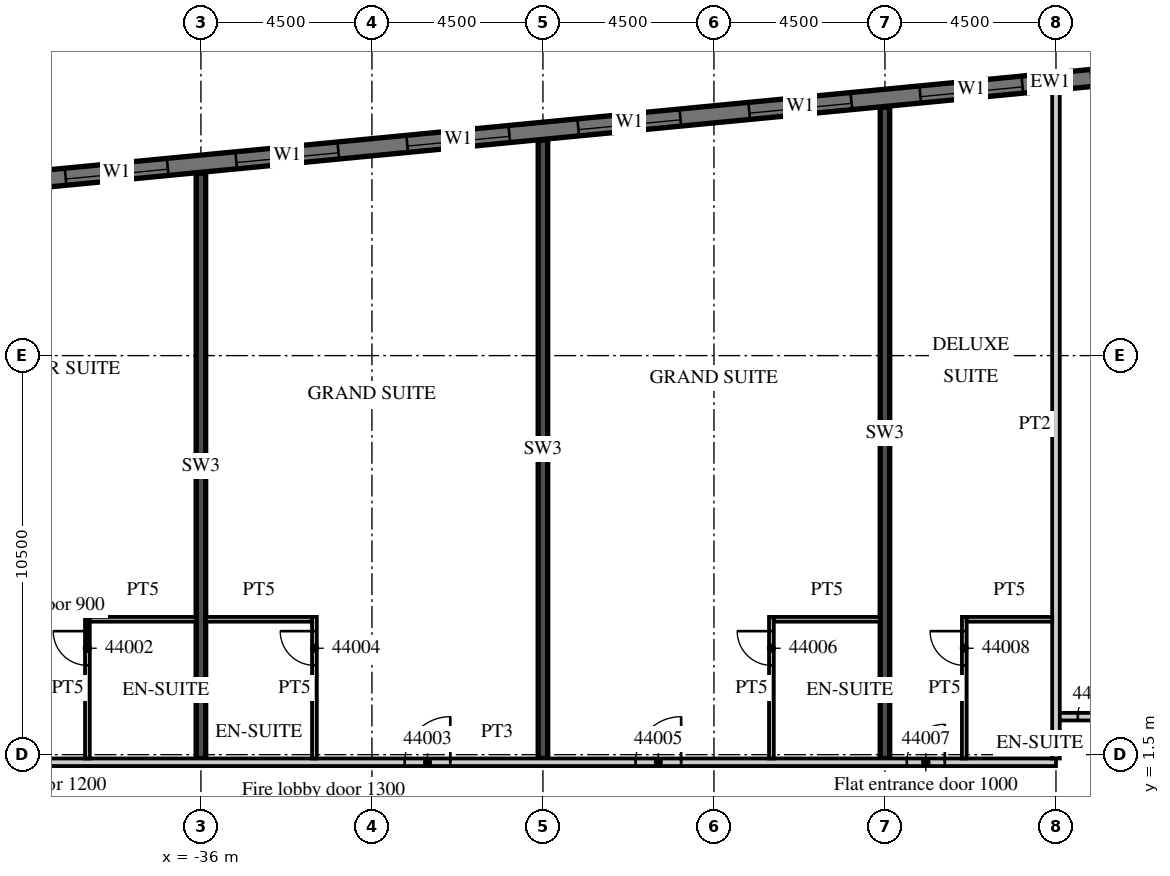
"""IFC4 building model, lengths in metres.
Left out: names, types, materials, properties, quantities, classifications, styles, units other than length and angle.
Written with IfcOpenShell. Run it as: python <this file> out.ifc"""

import sys

from ifc_helpers import new_model, si_unit, direction, frame, frame_2d, origin, place, context, subcontext, project, spatial, rectangle, extrude, element, fill, save


model = new_model("IFC4")
c1 = context("Model", 3, precision=1e-05, world=origin(), true_north=direction((0.0, 1.0)))
c2 = subcontext(c1, "Body", "Model", "MODEL_VIEW")
j1 = project(units=[si_unit("LENGTHUNIT", "METRE"), si_unit("PLANEANGLEUNIT", "RADIAN")], contexts=[c1])
p1 = place(None, origin())
s1 = spatial("IfcSite", under=j1, at=p1, CompositionType="ELEMENT")
p2 = place(p1, origin())
s2 = spatial("IfcBuilding", under=s1, at=p2, CompositionType="ELEMENT")
p3 = place(p2, frame((0.0, 0.0, 186.7)))
s3 = spatial("IfcBuildingStorey", under=s2, at=p3, CompositionType="ELEMENT", Elevation=186.7)
p4 = place(p3, frame((-36.0, 1.4, 0.0), z_axis=(0.0, 0.0, 1.0), x_axis=(0.0, 1.0, 0.0)))
e1 = element("IfcWall", 1, at=p4, inside=s3, PredefinedType="SHEAR", context=c2, shape_type="SweptSolid", body=[
    extrude(rectangle(XDim=15.401, YDim=0.25, at=frame_2d((7.701, 0.0))), origin(), (0.0, 0.0, 1.0), 3.3),
])
p5 = place(p3, frame((-27.0, 1.4, 0.0), z_axis=(0.0, 0.0, 1.0), x_axis=(0.0, 1.0, 0.0)))
e2 = element("IfcWall", 2, at=p5, inside=s3, PredefinedType="SHEAR", context=c2, shape_type="SweptSolid", body=[
    extrude(rectangle(XDim=16.268, YDim=0.25, at=frame_2d((8.134, 0.0))), origin(), (0.0, 0.0, 1.0), 3.3),
])
p6 = place(p3, frame((-18.0, 1.4, 0.0), z_axis=(0.0, 0.0, 1.0), x_axis=(0.0, 1.0, 0.0)))
e3 = element("IfcWall", 3, at=p6, inside=s3, PredefinedType="SHEAR", context=c2, shape_type="SweptSolid", body=[
    extrude(rectangle(XDim=17.134, YDim=0.25, at=frame_2d((8.567, 0.0))), origin(), (0.0, 0.0, 1.0), 3.3),
])
p7 = place(p3, frame((13.521, 21.817, 0.0), z_axis=(0.0, 0.0, 1.0), x_axis=(-0.995396508751, -0.095842529008, 0.0)))
e4 = element("IfcWall", 4, at=p7, inside=s3, PredefinedType="SOLIDWALL", context=c2, shape_type="SweptSolid", body=[
    extrude(rectangle(XDim=54.591, YDim=0.45, at=frame_2d((27.296, 0.0))), origin(), (0.0, 0.0, 1.0), 3.02),
])
p8 = place(p7, frame((0.91, 0.0, 0.45)))
e5 = element("IfcOpeningElement", 5, at=p8, cuts=e4, PredefinedType="OPENING", context=c2, shape_type="SweptSolid", body=[
    extrude(rectangle(XDim=2.7, YDim=2.25, at=frame_2d((1.35, 1.125))), frame((0.0, 0.235, 0.0), z_axis=(0.0, -1.0, 0.0), x_axis=(1.0, 0.0, 0.0)), (0.0, 0.0, 1.0), 0.47),
])
p9 = place(p7, frame((5.431, 0.0, 0.45)))
e6 = element("IfcOpeningElement", 6, at=p9, cuts=e4, PredefinedType="OPENING", context=c2, shape_type="SweptSolid", body=[
    extrude(rectangle(XDim=2.7, YDim=2.25, at=frame_2d((1.35, 1.125))), frame((0.0, 0.235, 0.0), z_axis=(0.0, -1.0, 0.0), x_axis=(1.0, 0.0, 0.0)), (0.0, 0.0, 1.0), 0.47),
])
p10 = place(p7, frame((9.952, 0.0, 0.45)))
e7 = element("IfcOpeningElement", 7, at=p10, cuts=e4, PredefinedType="OPENING", context=c2, shape_type="SweptSolid", body=[
    extrude(rectangle(XDim=2.7, YDim=2.25, at=frame_2d((1.35, 1.125))), frame((0.0, 0.235, 0.0), z_axis=(0.0, -1.0, 0.0), x_axis=(1.0, 0.0, 0.0)), (0.0, 0.0, 1.0), 0.47),
])
p11 = place(p7, frame((14.473, 0.0, 0.45)))
e8 = element("IfcOpeningElement", 8, at=p11, cuts=e4, PredefinedType="OPENING", context=c2, shape_type="SweptSolid", body=[
    extrude(rectangle(XDim=2.7, YDim=2.25, at=frame_2d((1.35, 1.125))), frame((0.0, 0.235, 0.0), z_axis=(0.0, -1.0, 0.0), x_axis=(1.0, 0.0, 0.0)), (0.0, 0.0, 1.0), 0.47),
])
p12 = place(p7, frame((18.994, 0.0, 0.45)))
e9 = element("IfcOpeningElement", 9, at=p12, cuts=e4, PredefinedType="OPENING", context=c2, shape_type="SweptSolid", body=[
    extrude(rectangle(XDim=2.7, YDim=2.25, at=frame_2d((1.35, 1.125))), frame((0.0, 0.235, 0.0), z_axis=(0.0, -1.0, 0.0), x_axis=(1.0, 0.0, 0.0)), (0.0, 0.0, 1.0), 0.47),
])
p13 = place(p7, frame((23.514, 0.0, 0.45)))
e10 = element("IfcOpeningElement", 10, at=p13, cuts=e4, PredefinedType="OPENING", context=c2, shape_type="SweptSolid", body=[
    extrude(rectangle(XDim=2.7, YDim=2.25, at=frame_2d((1.35, 1.125))), frame((0.0, 0.235, 0.0), z_axis=(0.0, -1.0, 0.0), x_axis=(1.0, 0.0, 0.0)), (0.0, 0.0, 1.0), 0.47),
])
p14 = place(p7, frame((28.035, 0.0, 0.45)))
e11 = element("IfcOpeningElement", 11, at=p14, cuts=e4, PredefinedType="OPENING", context=c2, shape_type="SweptSolid", body=[
    extrude(rectangle(XDim=2.7, YDim=2.25, at=frame_2d((1.35, 1.125))), frame((0.0, 0.235, 0.0), z_axis=(0.0, -1.0, 0.0), x_axis=(1.0, 0.0, 0.0)), (0.0, 0.0, 1.0), 0.47),
])
p15 = place(p7, frame((32.556, 0.0, 0.45)))
e12 = element("IfcOpeningElement", 12, at=p15, cuts=e4, PredefinedType="OPENING", context=c2, shape_type="SweptSolid", body=[
    extrude(rectangle(XDim=2.7, YDim=2.25, at=frame_2d((1.35, 1.125))), frame((0.0, 0.235, 0.0), z_axis=(0.0, -1.0, 0.0), x_axis=(1.0, 0.0, 0.0)), (0.0, 0.0, 1.0), 0.47),
])
p16 = place(p7, frame((37.077, 0.0, 0.45)))
e13 = element("IfcOpeningElement", 13, at=p16, cuts=e4, PredefinedType="OPENING", context=c2, shape_type="SweptSolid", body=[
    extrude(rectangle(XDim=2.7, YDim=2.25, at=frame_2d((1.35, 1.125))), frame((0.0, 0.235, 0.0), z_axis=(0.0, -1.0, 0.0), x_axis=(1.0, 0.0, 0.0)), (0.0, 0.0, 1.0), 0.47),
])
p17 = place(p7, frame((41.598, 0.0, 0.45)))
e14 = element("IfcOpeningElement", 14, at=p17, cuts=e4, PredefinedType="OPENING", context=c2, shape_type="SweptSolid", body=[
    extrude(rectangle(XDim=2.7, YDim=2.25, at=frame_2d((1.35, 1.125))), frame((0.0, 0.235, 0.0), z_axis=(0.0, -1.0, 0.0), x_axis=(1.0, 0.0, 0.0)), (0.0, 0.0, 1.0), 0.47),
])
p18 = place(p7, frame((46.118, 0.0, 0.45)))
e15 = element("IfcOpeningElement", 15, at=p18, cuts=e4, PredefinedType="OPENING", context=c2, shape_type="SweptSolid", body=[
    extrude(rectangle(XDim=2.7, YDim=2.25, at=frame_2d((1.35, 1.125))), frame((0.0, 0.235, 0.0), z_axis=(0.0, -1.0, 0.0), x_axis=(1.0, 0.0, 0.0)), (0.0, 0.0, 1.0), 0.47),
])
p19 = place(p7, frame((50.629, 0.0, 0.45)))
e16 = element("IfcOpeningElement", 16, at=p19, cuts=e4, PredefinedType="OPENING", context=c2, shape_type="SweptSolid", body=[
    extrude(rectangle(XDim=2.7, YDim=2.25, at=frame_2d((1.35, 1.125))), frame((0.0, 0.235, 0.0), z_axis=(0.0, -1.0, 0.0), x_axis=(1.0, 0.0, 0.0)), (0.0, 0.0, 1.0), 0.47),
])
p20 = place(p3, frame((-42.913, 1.3, 0.0), z_axis=(0.0, 0.0, 1.0), x_axis=(1.0, 0.0, 0.0)))
e17 = element("IfcWall", 17, at=p20, inside=s3, PredefinedType="PARTITIONING", context=c2, shape_type="SweptSolid", body=[
    extrude(rectangle(XDim=29.413, YDim=0.2, at=frame_2d((14.707, 0.0))), origin(), (0.0, 0.0, 1.0), 3.02),
])
p21 = place(p20, frame((1.406, 0.0, 0.0)))
e18 = element("IfcOpeningElement", 18, at=p21, cuts=e17, PredefinedType="OPENING", context=c2, shape_type="SweptSolid", body=[
    extrude(rectangle(XDim=1.2, YDim=2.1, at=frame_2d((0.6, 1.05))), frame((0.0, 0.11, 0.0), z_axis=(0.0, -1.0, 0.0), x_axis=(1.0, 0.0, 0.0)), (0.0, 0.0, 1.0), 0.22),
])
p22 = place(p20, frame((12.275, 0.0, 0.0)))
e19 = element("IfcOpeningElement", 19, at=p22, cuts=e17, PredefinedType="OPENING", context=c2, shape_type="SweptSolid", body=[
    extrude(rectangle(XDim=1.2, YDim=2.1, at=frame_2d((0.6, 1.05))), frame((0.0, 0.11, 0.0), z_axis=(0.0, -1.0, 0.0), x_axis=(1.0, 0.0, 0.0)), (0.0, 0.0, 1.0), 0.22),
])
p23 = place(p20, frame((18.35, 0.0, 0.0)))
e20 = element("IfcOpeningElement", 20, at=p23, cuts=e17, PredefinedType="OPENING", context=c2, shape_type="SweptSolid", body=[
    extrude(rectangle(XDim=1.2, YDim=2.1, at=frame_2d((0.6, 1.05))), frame((0.0, 0.11, 0.0), z_axis=(0.0, -1.0, 0.0), x_axis=(1.0, 0.0, 0.0)), (0.0, 0.0, 1.0), 0.22),
])
p24 = place(p20, frame((25.488, 0.0, 0.0)))
e21 = element("IfcOpeningElement", 21, at=p24, cuts=e17, PredefinedType="OPENING", context=c2, shape_type="SweptSolid", body=[
    extrude(rectangle(XDim=1.0, YDim=2.1, at=frame_2d((0.5, 1.05))), frame((0.0, 0.11, 0.0), z_axis=(0.0, -1.0, 0.0), x_axis=(1.0, 0.0, 0.0)), (0.0, 0.0, 1.0), 0.22),
])
p25 = place(p3, frame((-13.5, 2.5, 0.0), z_axis=(0.0, 0.0, 1.0), x_axis=(1.0, 0.0, 0.0)))
e22 = element("IfcWall", 22, at=p25, inside=s3, PredefinedType="PARTITIONING", context=c2, shape_type="SweptSolid", body=[
    extrude(rectangle(XDim=27.0, YDim=0.2, at=frame_2d((13.5, 0.0))), origin(), (0.0, 0.0, 1.0), 3.02),
])
p26 = place(p25, frame((0.575, 0.0, 0.0)))
e23 = element("IfcOpeningElement", 23, at=p26, cuts=e22, PredefinedType="OPENING", context=c2, shape_type="SweptSolid", body=[
    extrude(rectangle(XDim=1.0, YDim=2.1, at=frame_2d((0.5, 1.05))), frame((0.0, 0.11, 0.0), z_axis=(0.0, -1.0, 0.0), x_axis=(1.0, 0.0, 0.0)), (0.0, 0.0, 1.0), 0.22),
])
p27 = place(p25, frame((9.863, 0.0, 0.0)))
e24 = element("IfcOpeningElement", 24, at=p27, cuts=e22, PredefinedType="OPENING", context=c2, shape_type="SweptSolid", body=[
    extrude(rectangle(XDim=1.2, YDim=2.1, at=frame_2d((0.6, 1.05))), frame((0.0, 0.11, 0.0), z_axis=(0.0, -1.0, 0.0), x_axis=(1.0, 0.0, 0.0)), (0.0, 0.0, 1.0), 0.22),
])
p28 = place(p25, frame((18.862, 0.0, 0.0)))
e25 = element("IfcOpeningElement", 25, at=p28, cuts=e22, PredefinedType="OPENING", context=c2, shape_type="SweptSolid", body=[
    extrude(rectangle(XDim=1.2, YDim=2.1, at=frame_2d((0.6, 1.05))), frame((0.0, 0.11, 0.0), z_axis=(0.0, -1.0, 0.0), x_axis=(1.0, 0.0, 0.0)), (0.0, 0.0, 1.0), 0.22),
])
p29 = place(p25, frame((25.425, 0.0, 0.0)))
e26 = element("IfcOpeningElement", 26, at=p29, cuts=e22, PredefinedType="OPENING", context=c2, shape_type="SweptSolid", body=[
    extrude(rectangle(XDim=1.0, YDim=2.1, at=frame_2d((0.5, 1.05))), frame((0.0, 0.11, 0.0), z_axis=(0.0, -1.0, 0.0), x_axis=(1.0, 0.0, 0.0)), (0.0, 0.0, 1.0), 0.22),
])
p30 = place(p3, frame((-38.987, 1.4, 0.0), z_axis=(0.0, 0.0, 1.0), x_axis=(0.0, 1.0, 0.0)))
e27 = element("IfcWall", 27, at=p30, inside=s3, PredefinedType="PARTITIONING", context=c2, shape_type="SweptSolid", body=[
    extrude(rectangle(XDim=3.725, YDim=0.125, at=frame_2d((1.863, 0.0))), origin(), (0.0, 0.0, 1.0), 3.02),
])
p31 = place(p30, frame((2.45, 0.0, 0.0)))
e28 = element("IfcOpeningElement", 28, at=p31, cuts=e27, PredefinedType="OPENING", context=c2, shape_type="SweptSolid", body=[
    extrude(rectangle(XDim=0.9, YDim=2.1, at=frame_2d((0.45, 1.05))), frame((0.0, 0.073, 0.0), z_axis=(0.0, -1.0, 0.0), x_axis=(1.0, 0.0, 0.0)), (0.0, 0.0, 1.0), 0.145),
])
p32 = place(p3, frame((-38.925, 5.062, 0.0), z_axis=(0.0, 0.0, 1.0), x_axis=(1.0, 0.0, 0.0)))
e29 = element("IfcWall", 29, at=p32, inside=s3, PredefinedType="PARTITIONING", context=c2, shape_type="SweptSolid", body=[
    extrude(rectangle(XDim=2.8, YDim=0.125, at=frame_2d((1.4, 0.0))), origin(), (0.0, 0.0, 1.0), 3.02),
])
p33 = place(p3, frame((-33.013, 1.4, 0.0), z_axis=(0.0, 0.0, 1.0), x_axis=(0.0, 1.0, 0.0)))
e30 = element("IfcWall", 30, at=p33, inside=s3, PredefinedType="PARTITIONING", context=c2, shape_type="SweptSolid", body=[
    extrude(rectangle(XDim=3.725, YDim=0.125, at=frame_2d((1.863, 0.0))), origin(), (0.0, 0.0, 1.0), 3.02),
])
p34 = place(p33, frame((2.45, 0.0, 0.0)))
e31 = element("IfcOpeningElement", 31, at=p34, cuts=e30, PredefinedType="OPENING", context=c2, shape_type="SweptSolid", body=[
    extrude(rectangle(XDim=0.9, YDim=2.1, at=frame_2d((0.45, 1.05))), frame((0.0, 0.073, 0.0), z_axis=(0.0, -1.0, 0.0), x_axis=(1.0, 0.0, 0.0)), (0.0, 0.0, 1.0), 0.145),
])
p35 = place(p3, frame((-35.875, 5.062, 0.0), z_axis=(0.0, 0.0, 1.0), x_axis=(1.0, 0.0, 0.0)))
e32 = element("IfcWall", 32, at=p35, inside=s3, PredefinedType="PARTITIONING", context=c2, shape_type="SweptSolid", body=[
    extrude(rectangle(XDim=2.8, YDim=0.125, at=frame_2d((1.4, 0.0))), origin(), (0.0, 0.0, 1.0), 3.02),
])
p36 = place(p3, frame((-20.988, 1.4, 0.0), z_axis=(0.0, 0.0, 1.0), x_axis=(0.0, 1.0, 0.0)))
e33 = element("IfcWall", 33, at=p36, inside=s3, PredefinedType="PARTITIONING", context=c2, shape_type="SweptSolid", body=[
    extrude(rectangle(XDim=3.725, YDim=0.125, at=frame_2d((1.863, 0.0))), origin(), (0.0, 0.0, 1.0), 3.02),
])
p37 = place(p36, frame((2.45, 0.0, 0.0)))
e34 = element("IfcOpeningElement", 34, at=p37, cuts=e33, PredefinedType="OPENING", context=c2, shape_type="SweptSolid", body=[
    extrude(rectangle(XDim=0.9, YDim=2.1, at=frame_2d((0.45, 1.05))), frame((0.0, 0.073, 0.0), z_axis=(0.0, -1.0, 0.0), x_axis=(1.0, 0.0, 0.0)), (0.0, 0.0, 1.0), 0.145),
])
p38 = place(p3, frame((-20.925, 5.062, 0.0), z_axis=(0.0, 0.0, 1.0), x_axis=(1.0, 0.0, 0.0)))
e35 = element("IfcWall", 35, at=p38, inside=s3, PredefinedType="PARTITIONING", context=c2, shape_type="SweptSolid", body=[
    extrude(rectangle(XDim=2.8, YDim=0.125, at=frame_2d((1.4, 0.0))), origin(), (0.0, 0.0, 1.0), 3.02),
])
p39 = place(p3, frame((-13.5, 1.4, 0.0), z_axis=(0.0, 0.0, 1.0), x_axis=(0.0, 1.0, 0.0)))
e36 = element("IfcWall", 36, at=p39, inside=s3, PredefinedType="PARTITIONING", context=c2, shape_type="SweptSolid", body=[
    extrude(rectangle(XDim=17.59, YDim=0.2, at=frame_2d((8.795, 0.0))), origin(), (0.0, 0.0, 1.0), 3.02),
])
p40 = place(p3, frame((-15.912, 1.4, 0.0), z_axis=(0.0, 0.0, 1.0), x_axis=(0.0, 1.0, 0.0)))
e37 = element("IfcWall", 37, at=p40, inside=s3, PredefinedType="PARTITIONING", context=c2, shape_type="SweptSolid", body=[
    extrude(rectangle(XDim=3.725, YDim=0.125, at=frame_2d((1.863, 0.0))), origin(), (0.0, 0.0, 1.0), 3.02),
])
p41 = place(p40, frame((2.45, 0.0, 0.0)))
e38 = element("IfcOpeningElement", 38, at=p41, cuts=e37, PredefinedType="OPENING", context=c2, shape_type="SweptSolid", body=[
    extrude(rectangle(XDim=0.9, YDim=2.1, at=frame_2d((0.45, 1.05))), frame((0.0, 0.073, 0.0), z_axis=(0.0, -1.0, 0.0), x_axis=(1.0, 0.0, 0.0)), (0.0, 0.0, 1.0), 0.145),
])
p42 = place(p3, frame((-15.85, 5.062, 0.0), z_axis=(0.0, 0.0, 1.0), x_axis=(1.0, 0.0, 0.0)))
e39 = element("IfcWall", 39, at=p42, inside=s3, PredefinedType="PARTITIONING", context=c2, shape_type="SweptSolid", body=[
    extrude(rectangle(XDim=2.25, YDim=0.125, at=frame_2d((1.125, 0.0))), origin(), (0.0, 0.0, 1.0), 3.02),
])
p43 = place(p14, origin())
e40 = element("IfcWindow", 40, at=p43, inside=s3, PartitioningType="SINGLE_PANEL", PredefinedType="WINDOW", context=c2, shape_type="SweptSolid", body=[
    extrude(rectangle(XDim=2.7, YDim=2.25, at=frame_2d((1.35, 1.125))), frame((0.0, 0.09, 0.0), z_axis=(0.0, -1.0, 0.0), x_axis=(1.0, 0.0, 0.0)), (0.0, 0.0, 1.0), 0.06),
])
fill(e11, e40)
p44 = place(p15, origin())
e41 = element("IfcWindow", 41, at=p44, inside=s3, PartitioningType="SINGLE_PANEL", PredefinedType="WINDOW", context=c2, shape_type="SweptSolid", body=[
    extrude(rectangle(XDim=2.7, YDim=2.25, at=frame_2d((1.35, 1.125))), frame((0.0, 0.09, 0.0), z_axis=(0.0, -1.0, 0.0), x_axis=(1.0, 0.0, 0.0)), (0.0, 0.0, 1.0), 0.06),
])
fill(e12, e41)
p45 = place(p16, origin())
e42 = element("IfcWindow", 42, at=p45, inside=s3, PartitioningType="SINGLE_PANEL", PredefinedType="WINDOW", context=c2, shape_type="SweptSolid", body=[
    extrude(rectangle(XDim=2.7, YDim=2.25, at=frame_2d((1.35, 1.125))), frame((0.0, 0.09, 0.0), z_axis=(0.0, -1.0, 0.0), x_axis=(1.0, 0.0, 0.0)), (0.0, 0.0, 1.0), 0.06),
])
fill(e13, e42)
p46 = place(p17, origin())
e43 = element("IfcWindow", 43, at=p46, inside=s3, PartitioningType="SINGLE_PANEL", PredefinedType="WINDOW", context=c2, shape_type="SweptSolid", body=[
    extrude(rectangle(XDim=2.7, YDim=2.25, at=frame_2d((1.35, 1.125))), frame((0.0, 0.09, 0.0), z_axis=(0.0, -1.0, 0.0), x_axis=(1.0, 0.0, 0.0)), (0.0, 0.0, 1.0), 0.06),
])
fill(e14, e43)
p47 = place(p18, origin())
e44 = element("IfcWindow", 44, at=p47, inside=s3, PartitioningType="SINGLE_PANEL", PredefinedType="WINDOW", context=c2, shape_type="SweptSolid", body=[
    extrude(rectangle(XDim=2.7, YDim=2.25, at=frame_2d((1.35, 1.125))), frame((0.0, 0.09, 0.0), z_axis=(0.0, -1.0, 0.0), x_axis=(1.0, 0.0, 0.0)), (0.0, 0.0, 1.0), 0.06),
])
fill(e15, e44)
p48 = place(p19, origin())
e45 = element("IfcWindow", 45, at=p48, inside=s3, PartitioningType="SINGLE_PANEL", PredefinedType="WINDOW", context=c2, shape_type="SweptSolid", body=[
    extrude(rectangle(XDim=2.7, YDim=2.25, at=frame_2d((1.35, 1.125))), frame((0.0, 0.09, 0.0), z_axis=(0.0, -1.0, 0.0), x_axis=(1.0, 0.0, 0.0)), (0.0, 0.0, 1.0), 0.06),
])
fill(e16, e45)
p49 = place(p31, origin())
e46 = element("IfcDoor", 46, at=p49, inside=s3, OperationType="SINGLE_SWING_RIGHT", PredefinedType="DOOR", context=c2, shape_type="SweptSolid", body=[
    extrude(rectangle(XDim=0.9, YDim=2.1, at=frame_2d((0.45, 1.05))), frame((0.0, 0.025, 0.0), z_axis=(0.0, -1.0, 0.0), x_axis=(1.0, 0.0, 0.0)), (0.0, 0.0, 1.0), 0.05),
])
fill(e28, e46)
p50 = place(p22, origin())
e47 = element("IfcDoor", 47, at=p50, inside=s3, OperationType="SINGLE_SWING_RIGHT", PredefinedType="DOOR", context=c2, shape_type="SweptSolid", body=[
    extrude(rectangle(XDim=1.2, YDim=2.1, at=frame_2d((0.6, 1.05))), frame((0.0, 0.025, 0.0), z_axis=(0.0, -1.0, 0.0), x_axis=(1.0, 0.0, 0.0)), (0.0, 0.0, 1.0), 0.05),
])
fill(e19, e47)
p51 = place(p34, origin())
e48 = element("IfcDoor", 48, at=p51, inside=s3, OperationType="SINGLE_SWING_RIGHT", PredefinedType="DOOR", context=c2, shape_type="SweptSolid", body=[
    extrude(rectangle(XDim=0.9, YDim=2.1, at=frame_2d((0.45, 1.05))), frame((0.0, 0.025, 0.0), z_axis=(0.0, -1.0, 0.0), x_axis=(1.0, 0.0, 0.0)), (0.0, 0.0, 1.0), 0.05),
])
fill(e31, e48)
p52 = place(p23, origin())
e49 = element("IfcDoor", 49, at=p52, inside=s3, OperationType="SINGLE_SWING_RIGHT", PredefinedType="DOOR", context=c2, shape_type="SweptSolid", body=[
    extrude(rectangle(XDim=1.2, YDim=2.1, at=frame_2d((0.6, 1.05))), frame((0.0, 0.025, 0.0), z_axis=(0.0, -1.0, 0.0), x_axis=(1.0, 0.0, 0.0)), (0.0, 0.0, 1.0), 0.05),
])
fill(e20, e49)
p53 = place(p37, origin())
e50 = element("IfcDoor", 50, at=p53, inside=s3, OperationType="SINGLE_SWING_RIGHT", PredefinedType="DOOR", context=c2, shape_type="SweptSolid", body=[
    extrude(rectangle(XDim=0.9, YDim=2.1, at=frame_2d((0.45, 1.05))), frame((0.0, 0.025, 0.0), z_axis=(0.0, -1.0, 0.0), x_axis=(1.0, 0.0, 0.0)), (0.0, 0.0, 1.0), 0.05),
])
fill(e34, e50)
p54 = place(p24, origin())
e51 = element("IfcDoor", 51, at=p54, inside=s3, OperationType="SINGLE_SWING_RIGHT", PredefinedType="DOOR", context=c2, shape_type="SweptSolid", body=[
    extrude(rectangle(XDim=1.0, YDim=2.1, at=frame_2d((0.5, 1.05))), frame((0.0, 0.025, 0.0), z_axis=(0.0, -1.0, 0.0), x_axis=(1.0, 0.0, 0.0)), (0.0, 0.0, 1.0), 0.05),
])
fill(e21, e51)
p55 = place(p41, origin())
e52 = element("IfcDoor", 52, at=p55, inside=s3, OperationType="SINGLE_SWING_RIGHT", PredefinedType="DOOR", context=c2, shape_type="SweptSolid", body=[
    extrude(rectangle(XDim=0.9, YDim=2.1, at=frame_2d((0.45, 1.05))), frame((0.0, 0.025, 0.0), z_axis=(0.0, -1.0, 0.0), x_axis=(1.0, 0.0, 0.0)), (0.0, 0.0, 1.0), 0.05),
])
fill(e38, e52)
p56 = place(p26, origin())
e53 = element("IfcDoor", 53, at=p56, inside=s3, OperationType="SINGLE_SWING_RIGHT", PredefinedType="DOOR", context=c2, shape_type="SweptSolid", body=[
    extrude(rectangle(XDim=1.0, YDim=2.1, at=frame_2d((0.5, 1.05))), frame((0.0, 0.025, 0.0), z_axis=(0.0, -1.0, 0.0), x_axis=(1.0, 0.0, 0.0)), (0.0, 0.0, 1.0), 0.05),
])
fill(e23, e53)
save(model, sys.argv[1])
